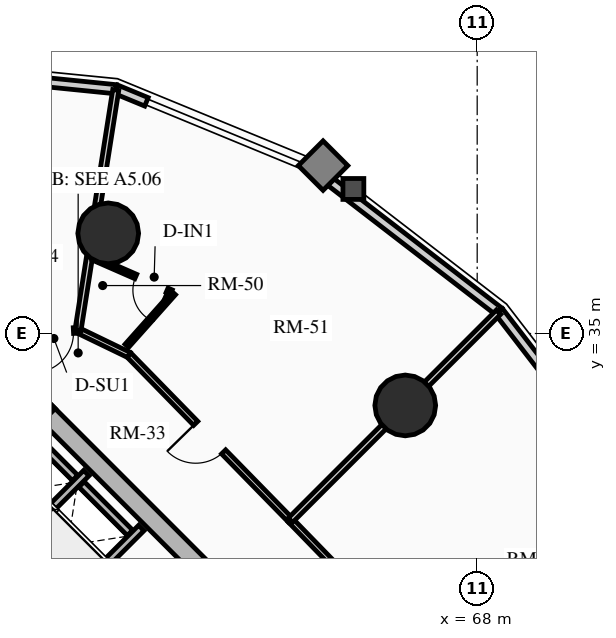
"""IFC4 building model, lengths in metres.
Left out: names, types, materials, properties, quantities, classifications, styles, units other than length and angle.
Written with IfcOpenShell. Run it as: python <this file> out.ifc"""

import sys

from ifc_helpers import new_model, si_unit, direction, frame, frame_2d, origin, origin_2d, place, context, subcontext, project, spatial, rectangle, circle, extrude, source, transform, mapped, element, fill, save


model = new_model("IFC4")
c1 = context("Model", 3, precision=1e-05, world=origin(), true_north=direction((0.0, 1.0)))
c2 = subcontext(c1, "Body", "Model", "MODEL_VIEW")
j1 = project(units=[si_unit("LENGTHUNIT", "METRE"), si_unit("PLANEANGLEUNIT", "RADIAN")], contexts=[c1])
p1 = place(None, origin())
s1 = spatial("IfcSite", under=j1, at=p1, CompositionType="ELEMENT")
p2 = place(p1, origin())
s2 = spatial("IfcBuilding", under=s1, at=p2, CompositionType="ELEMENT")
p3 = place(p2, frame((0.0, 0.0, 48.19)))
s3 = spatial("IfcBuildingStorey", under=s2, at=p3, CompositionType="ELEMENT", Elevation=48.19)
p4 = place(p3, frame((66.339, 23.227, 0.0), z_axis=(0.0, 0.0, 1.0), x_axis=(-0.707106781187, 0.707106781187, 0.0)))
e1 = element("IfcWall", 1, at=p4, inside=s3, PredefinedType="SHEAR", context=c2, shape_type="SweptSolid", body=[
    extrude(rectangle(XDim=14.3, YDim=0.5, at=frame_2d((7.15, 0.0))), origin(), (0.0, 0.0, 1.0), 2.91),
])
p5 = place(p3, frame((63.662, 20.904, 0.0), z_axis=(0.0, 0.0, 1.0), x_axis=(-0.707106781187, 0.707106781187, 0.0)))
e2 = element("IfcWall", 2, at=p5, inside=s3, PredefinedType="SHEAR", context=c2, shape_type="SweptSolid", body=[
    extrude(rectangle(XDim=13.8, YDim=0.35, at=frame_2d((6.9, 0.0))), origin(), (0.0, 0.0, 1.0), 2.91),
])
m1 = source(origin(), c2, "Body", "SweptSolid", [
    extrude(rectangle(XDim=1.1, YDim=2.015, at=frame_2d((0.55, 1.007))), frame((0.0, 0.185, 0.0), z_axis=(0.0, -1.0, 0.0), x_axis=(1.0, 0.0, 0.0)), (0.0, 0.0, 1.0), 0.37),
])
p6 = place(p5, frame((10.025, 0.0, 0.0)))
e3 = element("IfcOpeningElement", 3, at=p6, cuts=e2, PredefinedType="OPENING", context=c2, shape_type="MappedRepresentation", body=[
    mapped(m1, transform((0.0, 0.0, 0.0), x_axis=(1.0, 0.0, 0.0), y_axis=(0.0, 1.0, 0.0), z_axis=(0.0, 0.0, 1.0), scale=1.0)),
])
p7 = place(p5, frame((12.025, 0.0, 0.0)))
e4 = element("IfcOpeningElement", 4, at=p7, cuts=e2, PredefinedType="OPENING", context=c2, shape_type="MappedRepresentation", body=[
    mapped(m1, transform((0.0, 0.0, 0.0), x_axis=(1.0, 0.0, 0.0), y_axis=(0.0, 1.0, 0.0), z_axis=(0.0, 0.0, 1.0), scale=1.0)),
])
m2 = source(origin(), c2, "Body", "SweptSolid", [
    extrude(rectangle(XDim=1.15, YDim=2.02, at=frame_2d((0.575, 1.01))), frame((0.0, 0.185, 0.0), z_axis=(0.0, -1.0, 0.0), x_axis=(1.0, 0.0, 0.0)), (0.0, 0.0, 1.0), 0.37),
])
p8 = place(p5, frame((5.33, 0.0, 0.0)))
e5 = element("IfcOpeningElement", 5, at=p8, cuts=e2, PredefinedType="OPENING", context=c2, shape_type="MappedRepresentation", body=[
    mapped(m2, transform((0.0, 0.0, 0.0), x_axis=(1.0, 0.0, 0.0), y_axis=(0.0, 1.0, 0.0), z_axis=(0.0, 0.0, 1.0), scale=1.0)),
])
p9 = place(p3, frame((56.294, 33.024, 0.0), z_axis=(0.0, 0.0, 1.0), x_axis=(0.707106781187, 0.707106781187, 0.0)))
e6 = element("IfcColumn", 6, at=p9, inside=s3, PredefinedType="COLUMN", context=c2, shape_type="SweptSolid", body=[
    extrude(rectangle(XDim=0.85, YDim=0.85, at=origin_2d()), origin(), (0.0, 0.0, 1.0), 2.91),
])
for number, where, z_axis, x_axis in (
    (7, (66.107, 33.107, 0.0), (0.0, 0.0, 1.0), (1.0, 0.0, 0.0)),
    (8, (58.291, 37.635, 0.0), (0.0, 0.0, 1.0), (1.0, 0.0, 0.0)),
):
    element("IfcColumn", number, at=place(p3, frame(where, z_axis=z_axis, x_axis=x_axis)), inside=s3, PredefinedType="USERDEFINED", context=c2, shape_type="SweptSolid", body=[
        extrude(circle(Radius=0.8, at=origin_2d()), origin(), (0.0, 0.0, 1.0), 2.91),
    ])
p10 = place(p3, frame((63.844, 39.222, 0.0), z_axis=(0.0, 0.0, 1.0), x_axis=(0.792014314407, -0.610502519057, 0.0)))
e9 = element("IfcWall", 9, at=p10, inside=s3, PredefinedType="SOLIDWALL", context=c2, shape_type="SweptSolid", body=[
    extrude(rectangle(XDim=5.973, YDim=0.24, at=frame_2d((2.987, 0.0))), origin(), (0.0, 0.0, 1.0), 2.073),
])
p11 = place(p3, frame((58.493, 41.428, 0.0), z_axis=(0.0, 0.0, 1.0), x_axis=(0.924556017656, -0.381046152345, 0.0)))
e10 = element("IfcWall", 10, at=p11, inside=s3, PredefinedType="SOLIDWALL", context=c2, shape_type="SweptSolid", body=[
    extrude(rectangle(XDim=0.87, YDim=0.24, at=frame_2d((0.435, 0.0))), origin(), (0.0, 0.0, 1.0), 2.073),
])
p12 = place(p3, frame((53.043, 41.976, 0.0), z_axis=(0.0, 0.0, 1.0), x_axis=(0.994970765694, -0.100165739718, 0.0)))
e11 = element("IfcWall", 11, at=p12, inside=s3, PredefinedType="SOLIDWALL", context=c2, shape_type="SweptSolid", body=[
    extrude(rectangle(XDim=5.477, YDim=0.24, at=frame_2d((2.738, 0.0))), origin(), (0.0, 0.0, 1.0), 2.073),
])
m3 = source(origin(), c2, "Body", "SweptSolid", [
    extrude(rectangle(XDim=1.9, YDim=1.35, at=frame_2d((0.95, 0.675))), frame((0.0, 0.13, 0.0), z_axis=(0.0, -1.0, 0.0), x_axis=(1.0, 0.0, 0.0)), (0.0, 0.0, 1.0), 0.26),
])
p13 = place(p12, frame((1.788, 0.0, 0.65)))
e12 = element("IfcOpeningElement", 12, at=p13, cuts=e11, PredefinedType="OPENING", context=c2, shape_type="MappedRepresentation", body=[
    mapped(m3, transform((0.0, 0.0, 0.0), x_axis=(1.0, 0.0, 0.0), y_axis=(0.0, 1.0, 0.0), z_axis=(0.0, 0.0, 1.0), scale=1.0)),
])
p14 = place(p3, frame((68.575, 35.575, 0.0), z_axis=(0.0, 0.0, 1.0), x_axis=(0.610502519057, -0.792014314407, 0.0)))
e13 = element("IfcWall", 13, at=p14, inside=s3, PredefinedType="SOLIDWALL", context=c2, shape_type="SweptSolid", body=[
    extrude(rectangle(XDim=5.973, YDim=0.24, at=frame_2d((2.987, 0.0))), origin(), (0.0, 0.0, 1.0), 2.073),
])
m4 = source(origin(), c2, "Body", "SweptSolid", [
    extrude(rectangle(XDim=2.2, YDim=1.35, at=frame_2d((1.1, 0.675))), frame((0.0, 0.13, 0.0), z_axis=(0.0, -1.0, 0.0), x_axis=(1.0, 0.0, 0.0)), (0.0, 0.0, 1.0), 0.26),
])
p15 = place(p14, frame((1.887, 0.0, 0.65)))
e14 = element("IfcOpeningElement", 14, at=p15, cuts=e13, PredefinedType="OPENING", context=c2, shape_type="MappedRepresentation", body=[
    mapped(m4, transform((0.0, 0.0, 0.0), x_axis=(1.0, 0.0, 0.0), y_axis=(0.0, 1.0, 0.0), z_axis=(0.0, 0.0, 1.0), scale=1.0)),
])
p16 = place(p3, frame((57.062, 27.781, 0.0), z_axis=(0.0, 0.0, 1.0), x_axis=(0.707106781187, 0.707106781187, 0.0)))
e15 = element("IfcWall", 15, at=p16, inside=s3, PredefinedType="SHEAR", context=c2, shape_type="SweptSolid", body=[
    extrude(rectangle(XDim=2.97, YDim=0.2, at=frame_2d((1.485, 0.0))), origin(), (0.0, 0.0, 1.0), 2.91),
])
p17 = place(p3, frame((55.615, 29.227, 0.0), z_axis=(0.0, 0.0, 1.0), x_axis=(0.707147878904, 0.70706568108, 0.0)))
e16 = element("IfcWall", 16, at=p17, inside=s3, PredefinedType="SHEAR", context=c2, shape_type="SweptSolid", body=[
    extrude(rectangle(XDim=2.97, YDim=0.2, at=frame_2d((1.485, 0.0))), origin(), (0.0, 0.0, 1.0), 2.91),
])
p18 = place(p3, frame((58.865, 29.754, 0.0), z_axis=(0.0, 0.0, 1.0), x_axis=(-0.707174411312, 0.707039144592, 0.0)))
e17 = element("IfcWall", 17, at=p18, inside=s3, PredefinedType="SHEAR", context=c2, shape_type="SweptSolid", body=[
    extrude(rectangle(XDim=1.805, YDim=0.2, at=frame_2d((0.902, 0.0))), origin(), (0.0, 0.0, 1.0), 2.91),
])
p19 = place(p3, frame((57.419, 31.2, 0.0), z_axis=(0.0, 0.0, 1.0), x_axis=(-0.707032117043, 0.707181437447, 0.0)))
e18 = element("IfcWall", 18, at=p19, inside=s3, PredefinedType="SHEAR", context=c2, shape_type="SweptSolid", body=[
    extrude(rectangle(XDim=1.635, YDim=0.2, at=frame_2d((0.817, 0.0))), origin(), (0.0, 0.0, 1.0), 2.91),
])
p20 = place(p3, frame((63.086, 30.086, 0.0), z_axis=(0.0, 0.0, 1.0), x_axis=(-0.699032802832, 0.715089603172, 0.0)))
e19 = element("IfcWall", 19, at=p20, inside=s3, PredefinedType="PARTITIONING", context=c2, shape_type="SweptSolid", body=[
    extrude(rectangle(XDim=6.082, YDim=0.15, at=frame_2d((3.041, 0.0))), origin(), (0.0, 0.0, 1.0), 2.159),
])
m5 = source(origin(), c2, "Body", "SweptSolid", [
    extrude(rectangle(XDim=1.05, YDim=2.015, at=frame_2d((0.525, 1.007))), frame((0.0, 0.085, 0.0), z_axis=(0.0, -1.0, 0.0), x_axis=(1.0, 0.0, 0.0)), (0.0, 0.0, 1.0), 0.17),
])
p21 = place(p20, frame((2.516, 0.0, 0.0)))
e20 = element("IfcOpeningElement", 20, at=p21, cuts=e19, PredefinedType="OPENING", context=c2, shape_type="MappedRepresentation", body=[
    mapped(m5, transform((0.0, 0.0, 0.0), x_axis=(1.0, 0.0, 0.0), y_axis=(0.0, 1.0, 0.0), z_axis=(0.0, 0.0, 1.0), scale=1.0)),
])
p22 = place(p3, frame((58.835, 34.435, 0.0), z_axis=(0.0, 0.0, 1.0), x_axis=(-0.900352167336, 0.4351620098, 0.0)))
e21 = element("IfcWall", 21, at=p22, inside=s3, PredefinedType="PARTITIONING", context=c2, shape_type="SweptSolid", body=[
    extrude(rectangle(XDim=1.488, YDim=0.15, at=frame_2d((0.744, 0.0))), origin(), (0.0, 0.0, 1.0), 2.205),
])
p23 = place(p3, frame((57.495, 35.083, 0.0), z_axis=(0.0, 0.0, 1.0), x_axis=(-0.998536503254, -0.054081897798, 0.0)))
e22 = element("IfcWall", 22, at=p23, inside=s3, PredefinedType="PARTITIONING", context=c2, shape_type="SweptSolid", body=[
    extrude(rectangle(XDim=1.481, YDim=0.15, at=frame_2d((0.74, 0.0))), origin(), (0.0, 0.0, 1.0), 2.159),
])
p24 = place(p23, frame((0.12, 0.0, 0.0)))
e23 = element("IfcOpeningElement", 23, at=p24, cuts=e22, PredefinedType="OPENING", context=c2, shape_type="MappedRepresentation", body=[
    mapped(m5, transform((0.0, 0.0, 0.0), x_axis=(1.0, 0.0, 0.0), y_axis=(0.0, 1.0, 0.0), z_axis=(0.0, 0.0, 1.0), scale=1.0)),
])
p25 = place(p3, frame((67.247, 25.802, 0.0), z_axis=(0.0, 0.0, 1.0), x_axis=(-0.696771261687, 0.71729339108, 0.0)))
e24 = element("IfcWall", 24, at=p25, inside=s3, PredefinedType="PARTITIONING", context=c2, shape_type="SweptSolid", body=[
    extrude(rectangle(XDim=5.972, YDim=0.15, at=frame_2d((2.986, 0.0))), origin(), (0.0, 0.0, 1.0), 2.635),
])
m6 = source(origin(), c2, "Body", "SweptSolid", [
    extrude(rectangle(XDim=1.0, YDim=2.015, at=frame_2d((0.5, 1.007))), frame((0.0, 0.085, 0.0), z_axis=(0.0, -1.0, 0.0), x_axis=(1.0, 0.0, 0.0)), (0.0, 0.0, 1.0), 0.17),
])
p26 = place(p25, frame((2.486, 0.0, 0.0)))
e25 = element("IfcOpeningElement", 25, at=p26, cuts=e24, PredefinedType="OPENING", context=c2, shape_type="MappedRepresentation", body=[
    mapped(m6, transform((0.0, 0.0, 0.0), x_axis=(1.0, 0.0, 0.0), y_axis=(0.0, 1.0, 0.0), z_axis=(0.0, 0.0, 1.0), scale=1.0)),
])
p27 = place(p3, frame((63.086, 30.086, 0.0), z_axis=(0.0, 0.0, 1.0), x_axis=(0.707106781187, 0.707106781187, 0.0)))
e26 = element("IfcWall", 26, at=p27, inside=s3, PredefinedType="PARTITIONING", context=c2, shape_type="SweptSolid", body=[
    extrude(rectangle(XDim=7.743, YDim=0.16, at=frame_2d((3.872, 0.0))), origin(), (0.0, 0.0, 1.0), 2.073),
])
p28 = place(p3, frame((57.495, 35.083, 0.0), z_axis=(0.0, 0.0, 1.0), x_axis=(0.155296837382, 0.987867851638, 0.0)))
e27 = element("IfcWall", 27, at=p28, inside=s3, PredefinedType="PARTITIONING", context=c2, shape_type="SweptSolid", body=[
    extrude(rectangle(XDim=6.403, YDim=0.16, at=frame_2d((3.202, 0.0))), origin(), (0.0, 0.0, 1.0), 2.073),
])
p29 = place(p3, frame((58.78, 34.676, 0.0), z_axis=(0.0, 0.0, 1.0), x_axis=(0.6649433297, 0.746893813261, 0.0)))
e28 = element("IfcWall", 28, at=p29, inside=s3, PredefinedType="PARTITIONING", context=c2, shape_type="SweptSolid", body=[
    extrude(rectangle(XDim=1.856, YDim=0.125, at=frame_2d((0.928, 0.0))), origin(), (0.0, 0.0, 1.0), 2.205),
])
p30 = place(p3, frame((59.95, 36.09, 0.0), z_axis=(0.0, 0.0, 1.0), x_axis=(-0.916037613906, 0.401092370795, 0.0)))
e29 = element("IfcWall", 29, at=p30, inside=s3, PredefinedType="PARTITIONING", context=c2, shape_type="SweptSolid", body=[
    extrude(rectangle(XDim=2.247, YDim=0.125, at=frame_2d((1.124, 0.0))), origin(), (0.0, 0.0, 1.0), 2.159),
])
m7 = source(origin(), c2, "Body", "SweptSolid", [
    extrude(rectangle(XDim=0.9, YDim=2.005, at=frame_2d((0.45, 1.002))), frame((0.0, 0.073, 0.0), z_axis=(0.0, -1.0, 0.0), x_axis=(1.0, 0.0, 0.0)), (0.0, 0.0, 1.0), 0.145),
])
p31 = place(p30, frame((0.12, 0.0, 0.0)))
e30 = element("IfcOpeningElement", 30, at=p31, cuts=e29, PredefinedType="OPENING", context=c2, shape_type="MappedRepresentation", body=[
    mapped(m7, transform((0.0, 0.0, 0.0), x_axis=(1.0, 0.0, 0.0), y_axis=(0.0, 1.0, 0.0), z_axis=(0.0, 0.0, 1.0), scale=1.0)),
])
m8 = source(origin(), c2, "Body", "SweptSolid", [
    extrude(rectangle(XDim=1.05, YDim=2.015, at=frame_2d((0.525, 1.007))), frame((0.0, 0.025, 0.0), z_axis=(0.0, -1.0, 0.0), x_axis=(1.0, 0.0, 0.0)), (0.0, 0.0, 1.0), 0.05),
])
p32 = place(p24, origin())
e31 = element("IfcDoor", 31, at=p32, inside=s3, OperationType="SINGLE_SWING_RIGHT", PredefinedType="DOOR", context=c2, shape_type="MappedRepresentation", body=[
    mapped(m8, transform((0.0, 0.0, 0.0), x_axis=(1.0, 0.0, 0.0), y_axis=(0.0, 1.0, 0.0), z_axis=(0.0, 0.0, 1.0), scale=1.0)),
])
fill(e23, e31)
p33 = place(p21, origin())
e32 = element("IfcDoor", 32, at=p33, inside=s3, OperationType="SINGLE_SWING_RIGHT", PredefinedType="DOOR", context=c2, shape_type="MappedRepresentation", body=[
    mapped(m8, transform((0.0, 0.0, 0.0), x_axis=(1.0, 0.0, 0.0), y_axis=(0.0, 1.0, 0.0), z_axis=(0.0, 0.0, 1.0), scale=1.0)),
])
fill(e20, e32)
m9 = source(origin(), c2, "Body", "SweptSolid", [
    extrude(rectangle(XDim=0.9, YDim=2.005, at=frame_2d((0.45, 1.002))), frame((0.0, 0.025, 0.0), z_axis=(0.0, -1.0, 0.0), x_axis=(1.0, 0.0, 0.0)), (0.0, 0.0, 1.0), 0.05),
])
p34 = place(p31, origin())
e33 = element("IfcDoor", 33, at=p34, inside=s3, OperationType="SINGLE_SWING_LEFT", PredefinedType="DOOR", context=c2, shape_type="MappedRepresentation", body=[
    mapped(m9, transform((0.0, 0.0, 0.0), x_axis=(1.0, 0.0, 0.0), y_axis=(0.0, 1.0, 0.0), z_axis=(0.0, 0.0, 1.0), scale=1.0)),
])
fill(e30, e33)
save(model, sys.argv[1])
